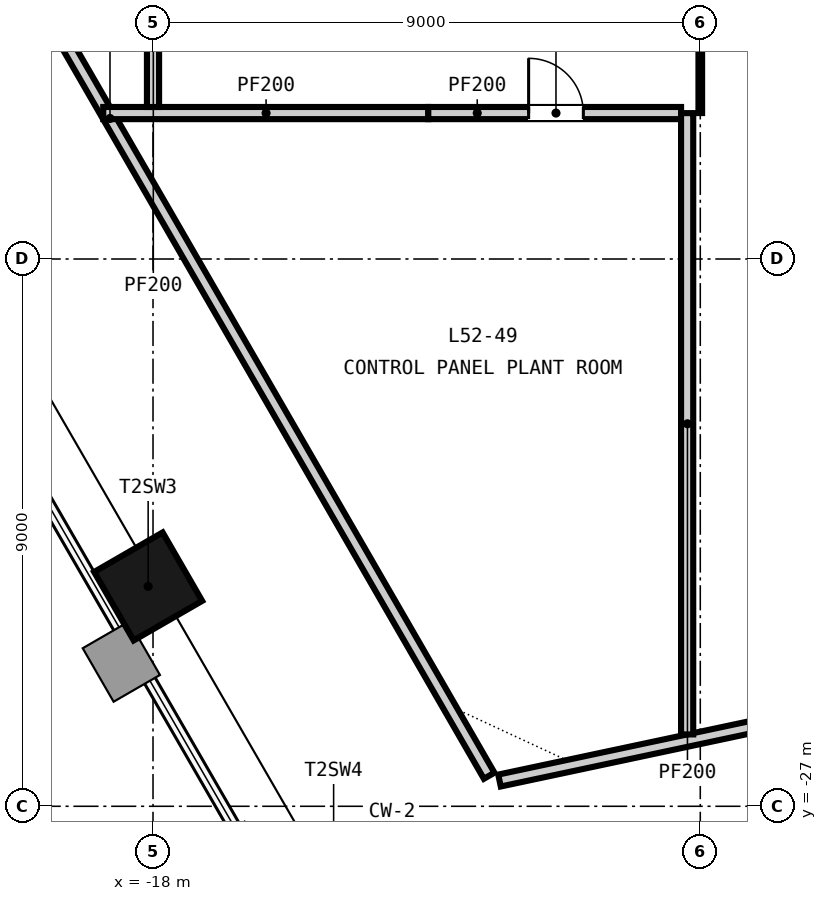
"""IFC4 building model, lengths in metres.
Left out: names, types, materials, properties, quantities, classifications, styles, units other than length and angle.
Written with IfcOpenShell. Run it as: python <this file> out.ifc"""

import sys

from ifc_helpers import new_model, si_unit, direction, frame, frame_2d, origin, origin_2d, place, context, subcontext, project, spatial, rectangle, extrude, element, fill, save


model = new_model("IFC4")
c1 = context("Model", 3, precision=1e-05, world=origin(), true_north=direction((0.0, 1.0)))
c2 = subcontext(c1, "Body", "Model", "MODEL_VIEW")
j1 = project(units=[si_unit("LENGTHUNIT", "METRE"), si_unit("PLANEANGLEUNIT", "RADIAN")], contexts=[c1])
p1 = place(None, origin())
s1 = spatial("IfcSite", under=j1, at=p1, CompositionType="ELEMENT")
p2 = place(p1, origin())
s2 = spatial("IfcBuilding", under=s1, at=p2, CompositionType="ELEMENT")
p3 = place(p2, frame((0.0, 0.0, 207.3)))
s3 = spatial("IfcBuildingStorey", under=s2, at=p3, CompositionType="ELEMENT", Elevation=207.3)
p4 = place(p3, frame((-18.08, -23.385, -0.3), z_axis=(0.0, 0.0, 1.0), x_axis=(0.5, -0.866025403784, 0.0)))
e1 = element("IfcColumn", 1, at=p4, inside=s3, PredefinedType="COLUMN", context=c2, shape_type="SweptSolid", body=[
    extrude(rectangle(XDim=1.3, YDim=1.3, at=origin_2d()), origin(), (0.0, 0.0, 1.0), 4.5),
])
p5 = place(p3, frame((-18.818, -15.6, 0.0), z_axis=(0.0, 0.0, 1.0), x_axis=(1.0, 0.0, 0.0)))
e2 = element("IfcWall", 2, at=p5, inside=s3, PredefinedType="PARTITIONING", context=c2, shape_type="SweptSolid", body=[
    extrude(rectangle(XDim=5.345, YDim=0.2, at=frame_2d((2.673, 0.0))), origin(), (0.0, 0.0, 1.0), 4.2),
])
p6 = place(p3, frame((-13.473, -15.6, 0.0), z_axis=(0.0, 0.0, 1.0), x_axis=(1.0, 0.0, 0.0)))
e3 = element("IfcWall", 3, at=p6, inside=s3, PredefinedType="PARTITIONING", context=c2, shape_type="SweptSolid", body=[
    extrude(rectangle(XDim=4.157, YDim=0.2, at=frame_2d((2.079, 0.0))), origin(), (0.0, 0.0, 1.0), 3.749),
])
p7 = place(p6, frame((1.65, 0.0, 0.0)))
e4 = element("IfcOpeningElement", 4, at=p7, cuts=e3, PredefinedType="OPENING", context=c2, shape_type="SweptSolid", body=[
    extrude(rectangle(XDim=0.9, YDim=2.1, at=frame_2d((0.45, 1.05))), frame((0.0, 0.11, 0.0), z_axis=(0.0, -1.0, 0.0), x_axis=(1.0, 0.0, 0.0)), (0.0, 0.0, 1.0), 0.22),
])
p8 = place(p3, frame((-18.0, -15.5, 0.0), z_axis=(0.0, 0.0, 1.0), x_axis=(0.0, 1.0, 0.0)))
e5 = element("IfcWall", 5, at=p8, inside=s3, PredefinedType="PARTITIONING", context=c2, shape_type="SweptSolid", body=[
    extrude(rectangle(XDim=12.3, YDim=0.2, at=frame_2d((6.15, 0.0))), origin(), (0.0, 0.0, 1.0), 4.2),
])
p9 = place(p8, frame((5.65, 0.0, 0.0)))
e6 = element("IfcOpeningElement", 6, at=p9, cuts=e5, PredefinedType="OPENING", context=c2, shape_type="SweptSolid", body=[
    extrude(rectangle(XDim=1.0, YDim=2.1, at=frame_2d((0.5, 1.05))), frame((0.0, 0.11, 0.0), z_axis=(0.0, -1.0, 0.0), x_axis=(1.0, 0.0, 0.0)), (0.0, 0.0, 1.0), 0.22),
])
p10 = place(p3, frame((-9.216, -25.818, 0.0), z_axis=(0.0, 0.0, 1.0), x_axis=(0.0, 1.0, 0.0)))
e7 = element("IfcWall", 7, at=p10, inside=s3, PredefinedType="PARTITIONING", context=c2, shape_type="SweptSolid", body=[
    extrude(rectangle(XDim=10.217, YDim=0.2, at=frame_2d((5.109, 0.0))), origin(), (0.0, 0.0, 1.0), 4.2),
])
p11 = place(p3, frame((-9.0, -15.6, 0.0), z_axis=(0.0, 0.0, 1.0), x_axis=(0.0, 1.0, 0.0)))
e8 = element("IfcWall", 8, at=p11, inside=s3, PredefinedType="PARTITIONING", context=c2, shape_type="SweptSolid", body=[
    extrude(rectangle(XDim=6.599, YDim=0.06, at=frame_2d((3.3, 0.0))), origin(), (0.0, 0.0, 1.0), 4.2),
])
p12 = place(p3, frame((14.456, -20.889, 0.0), z_axis=(0.0, 0.0, 1.0), x_axis=(-0.978147962207, -0.207909990215, 0.0)))
e9 = element("IfcWall", 9, at=p12, inside=s3, PredefinedType="PARTITIONING", context=c2, shape_type="SweptSolid", body=[
    extrude(rectangle(XDim=27.355, YDim=0.2, at=frame_2d((13.678, 0.0))), origin(), (0.0, 0.0, 1.0), 4.2),
])
p13 = place(p3, frame((-12.472, -26.498, 0.0), z_axis=(0.0, 0.0, 1.0), x_axis=(-0.499996482004, 0.866027434891, 0.0)))
e10 = element("IfcWall", 10, at=p13, inside=s3, PredefinedType="PARTITIONING", context=c2, shape_type="SweptSolid", body=[
    extrude(rectangle(XDim=24.962, YDim=0.2, at=frame_2d((12.481, 0.0))), origin(), (0.0, 0.0, 1.0), 4.2),
])
p14 = place(p7, origin())
e11 = element("IfcDoor", 11, at=p14, inside=s3, OperationType="SINGLE_SWING_LEFT", PredefinedType="DOOR", context=c2, shape_type="SweptSolid", body=[
    extrude(rectangle(XDim=0.9, YDim=2.1, at=frame_2d((0.45, 1.05))), frame((0.0, 0.025, 0.0), z_axis=(0.0, -1.0, 0.0), x_axis=(1.0, 0.0, 0.0)), (0.0, 0.0, 1.0), 0.05),
])
fill(e4, e11)
save(model, sys.argv[1])
